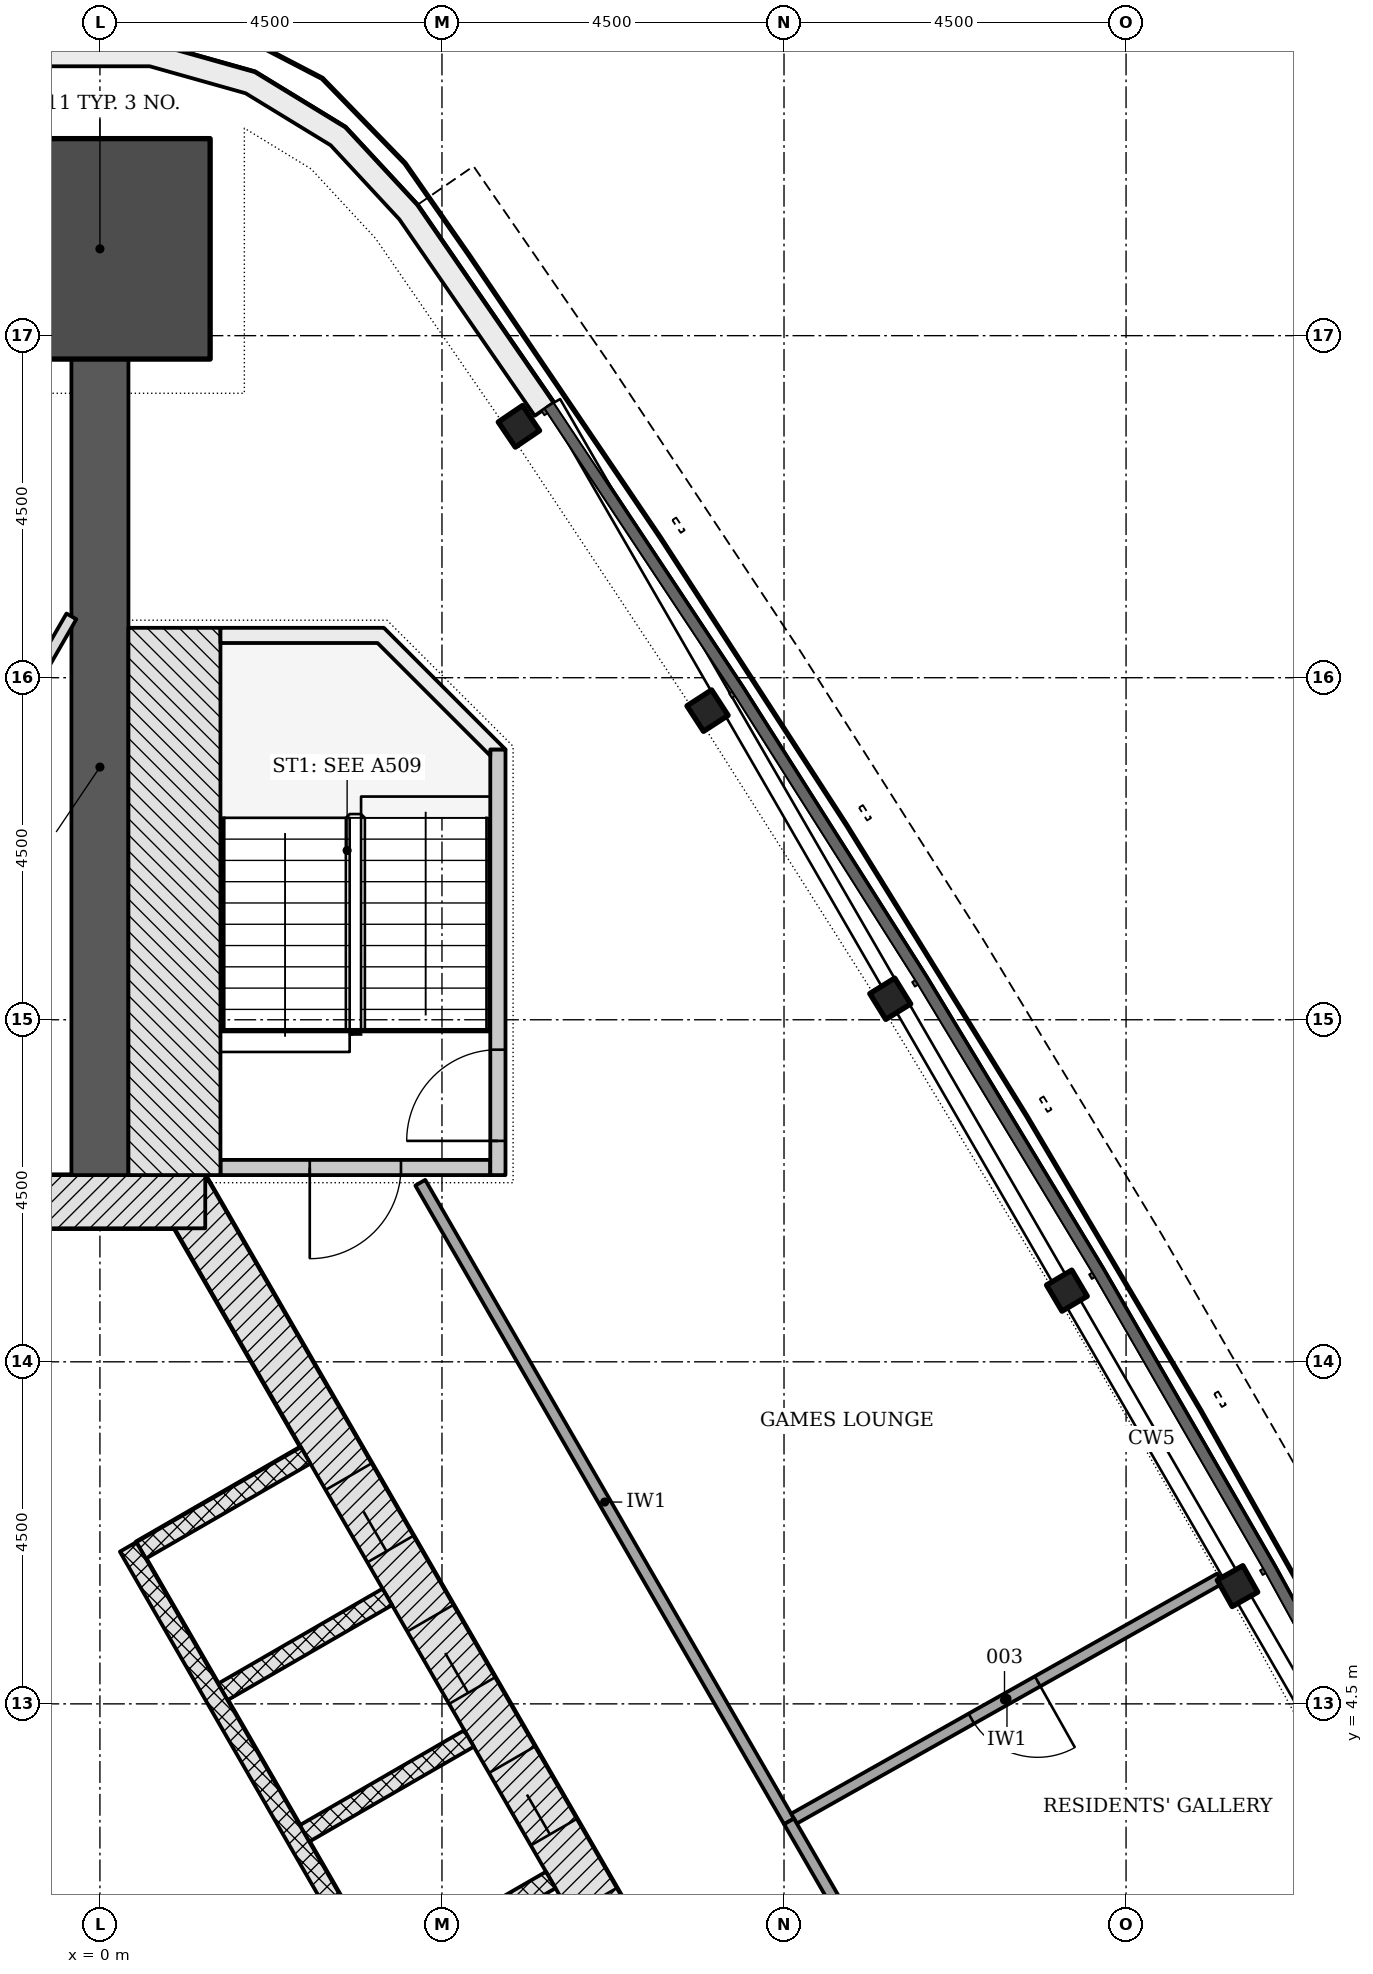
"""IFC4 building model, lengths in metres.
Left out: names, types, materials, properties, quantities, classifications, styles, units other than length and angle.
Written with IfcOpenShell. Run it as: python <this file> out.ifc"""

import sys

from ifc_helpers import new_model, si_unit, direction, frame, frame_2d, origin, origin_2d, place, context, subcontext, project, spatial, polyline, rectangle, i_section, outline, extrude, element, fill, save


model = new_model("IFC4")
c1 = context("Model", 3, precision=1e-05, world=origin(), true_north=direction((0.0, 1.0)))
c2 = subcontext(c1, "Body", "Model", "MODEL_VIEW")
j1 = project(units=[si_unit("LENGTHUNIT", "METRE"), si_unit("PLANEANGLEUNIT", "RADIAN")], contexts=[c1])
p1 = place(None, origin())
s1 = spatial("IfcSite", under=j1, at=p1, CompositionType="ELEMENT")
p2 = place(p1, origin())
s2 = spatial("IfcBuilding", under=s1, at=p2, CompositionType="ELEMENT")
p3 = place(p2, frame((0.0, 0.0, 150.9)))
s3 = spatial("IfcBuildingStorey", under=s2, at=p3, CompositionType="ELEMENT", Elevation=150.9)
p4 = place(p3, frame((10.311, -4.703, -0.2), z_axis=(0.0, 0.0, 1.0), x_axis=(-0.500001446645, 0.866024568562, 0.0)))
e1 = element("IfcWall", 1, at=p4, inside=s3, PredefinedType="SHEAR", context=c2, shape_type="SweptSolid", body=[
    extrude(rectangle(XDim=18.458, YDim=0.7, at=frame_2d((9.229, 0.0))), origin(), (0.0, 0.0, 1.0), 3.6),
])
p5 = place(p4, frame((4.379, 0.0, 0.2)))
e2 = element("IfcOpeningElement", 2, at=p5, cuts=e1, PredefinedType="OPENING", context=c2, shape_type="SweptSolid", body=[
    extrude(rectangle(XDim=1.1, YDim=2.1, at=frame_2d((0.55, 1.05))), frame((0.0, 0.36, 0.0), z_axis=(0.0, -1.0, 0.0), x_axis=(1.0, 0.0, 0.0)), (0.0, 0.0, 1.0), 0.72),
])
p6 = place(p4, frame((6.529, 0.0, 0.2)))
e3 = element("IfcOpeningElement", 3, at=p6, cuts=e1, PredefinedType="OPENING", context=c2, shape_type="SweptSolid", body=[
    extrude(rectangle(XDim=1.1, YDim=2.1, at=frame_2d((0.55, 1.05))), frame((0.0, 0.36, 0.0), z_axis=(0.0, -1.0, 0.0), x_axis=(1.0, 0.0, 0.0)), (0.0, 0.0, 1.0), 0.72),
])
p7 = place(p4, frame((8.679, 0.0, 0.2)))
e4 = element("IfcOpeningElement", 4, at=p7, cuts=e1, PredefinedType="OPENING", context=c2, shape_type="SweptSolid", body=[
    extrude(rectangle(XDim=1.1, YDim=2.1, at=frame_2d((0.55, 1.05))), frame((0.0, 0.36, 0.0), z_axis=(0.0, -1.0, 0.0), x_axis=(1.0, 0.0, 0.0)), (0.0, 0.0, 1.0), 0.72),
])
p8 = place(p4, frame((10.829, 0.0, 0.2)))
e5 = element("IfcOpeningElement", 5, at=p8, cuts=e1, PredefinedType="OPENING", context=c2, shape_type="SweptSolid", body=[
    extrude(rectangle(XDim=1.1, YDim=2.1, at=frame_2d((0.55, 1.05))), frame((0.0, 0.36, 0.0), z_axis=(0.0, -1.0, 0.0), x_axis=(1.0, 0.0, 0.0)), (0.0, 0.0, 1.0), 0.72),
])
p9 = place(p4, frame((12.979, 0.0, 0.2)))
e6 = element("IfcOpeningElement", 6, at=p9, cuts=e1, PredefinedType="OPENING", context=c2, shape_type="SweptSolid", body=[
    extrude(rectangle(XDim=1.1, YDim=2.1, at=frame_2d((0.55, 1.05))), frame((0.0, 0.36, 0.0), z_axis=(0.0, -1.0, 0.0), x_axis=(1.0, 0.0, 0.0)), (0.0, 0.0, 1.0), 0.72),
])
p10 = place(p3, frame((1.386, 11.106, -0.2), z_axis=(0.0, 0.0, 1.0), x_axis=(-1.0, 0.0, 0.0)))
e7 = element("IfcWall", 7, at=p10, inside=s3, PredefinedType="SHEAR", context=c2, shape_type="SweptSolid", body=[
    extrude(rectangle(XDim=2.771, YDim=0.7, at=frame_2d((1.386, 0.0))), origin(), (0.0, 0.0, 1.0), 3.6),
])
p11 = place(p3, frame((0.0, 11.456, -0.2), z_axis=(0.0, 0.0, 1.0), x_axis=(0.0, 1.0, 0.0)))
e8 = element("IfcWall", 8, at=p11, inside=s3, PredefinedType="SHEAR", context=c2, shape_type="SweptSolid", body=[
    extrude(rectangle(XDim=10.736, YDim=0.75, at=frame_2d((5.368, 0.0))), origin(), (0.0, 0.0, 1.0), 3.6),
])
p12 = place(p3, frame((0.0, 23.642, -0.2), z_axis=(0.0, 0.0, 1.0), x_axis=(0.0, 1.0, 0.0)))
e9 = element("IfcColumn", 9, at=p12, inside=s3, PredefinedType="COLUMN", context=c2, shape_type="SweptSolid", body=[
    extrude(rectangle(XDim=2.9, YDim=2.9, at=origin_2d()), origin(), (0.0, 0.0, 1.0), 3.6),
])
for number, where, z_axis, x_axis in (
    (10, (14.966, 6.049, -0.2), (0.0, 0.0, 1.0), (-0.491, 0.871, 0.0)),
    (11, (12.722, 9.936, -0.2), (0.0, 0.0, 1.0), (-0.509, 0.861, 0.0)),
    (12, (10.397, 13.776, -0.2), (0.0, 0.0, 1.0), (-0.527, 0.85, 0.0)),
    (13, (7.994, 17.567, -0.2), (0.0, 0.0, 1.0), (-0.544, 0.839, 0.0)),
    (14, (5.512, 21.307, -0.2), (0.0, 0.0, 1.0), (-0.561, 0.828, 0.0)),
):
    element("IfcColumn", number, at=place(p3, frame(where, z_axis=z_axis, x_axis=x_axis)), inside=s3, PredefinedType="COLUMN", context=c2, shape_type="SweptSolid", body=[
        extrude(i_section(OverallWidth=0.399, OverallDepth=0.386, WebThickness=0.021, FlangeThickness=0.033, FilletRadius=0.015, at=origin_2d()), origin(), (0.0, 0.0, 1.0), 3.6),
    ])
p13 = place(p3, origin())
e15 = element("IfcWall", 15, at=p13, inside=s3, PredefinedType="NOTDEFINED", context=c2, shape_type="SweptSolid", body=[
    extrude(outline(polyline([(5.968, 21.616), (4.174, 24.219), (3.227, 25.24), (2.038, 25.967), (0.697, 26.344), (-0.697, 26.344), (-2.038, 25.967), (-3.227, 25.24), (-4.174, 24.219), (-5.968, 21.616), (-5.721, 21.446), (-3.939, 24.03), (-3.035, 25.005), (-1.917, 25.689), (-0.655, 26.044), (0.655, 26.044), (1.917, 25.689), (3.035, 25.005), (3.939, 24.03), (5.721, 21.446), (5.968, 21.616)])), origin(), (0.0, 0.0, 1.0), 3.3),
])
p14 = place(p3, frame((5.931, 2.183, -0.2), z_axis=(0.0, 0.0, 1.0), x_axis=(-0.866047370643, -0.499961950354, 0.0)))
e16 = element("IfcWall", 16, at=p14, inside=s3, PredefinedType="PARTITIONING", context=c2, shape_type="SweptSolid", body=[
    extrude(rectangle(XDim=2.5, YDim=0.25, at=frame_2d((1.25, 0.0))), origin(), (0.0, 0.0, 1.0), 3.6),
])
for number, where, z_axis, x_axis in (
    (17, (4.856, 4.045, -0.2), (0.0, 0.0, 1.0), (-0.866, -0.5, 0.0)),
    (18, (3.781, 5.907, -0.2), (0.0, 0.0, 1.0), (-0.866, -0.5, 0.0)),
    (19, (2.706, 7.769, -0.2), (0.0, 0.0, 1.0), (-0.866, -0.5, 0.0)),
):
    element("IfcWall", number, at=place(p3, frame(where, z_axis=z_axis, x_axis=x_axis)), inside=s3, PredefinedType="PARTITIONING", context=c2, shape_type="SweptSolid", body=[
        extrude(rectangle(XDim=2.5, YDim=0.25, at=frame_2d((1.25, 0.0))), origin(), (0.0, 0.0, 1.0), 3.6),
    ])
p15 = place(p3, frame((5.87, -2.961, 0.0), z_axis=(0.0, 0.0, 1.0), x_axis=(-0.50000615651, 0.866021849293, 0.0)))
e20 = element("IfcWall", 20, at=p15, inside=s3, PredefinedType="PARTITIONING", context=c2, shape_type="SweptSolid", body=[
    extrude(rectangle(XDim=11.0, YDim=0.25, at=frame_2d((5.5, 0.0))), origin(), (0.0, 0.0, 1.0), 3.4),
])
p16 = place(p3, frame((5.135, 11.556, -0.2), z_axis=(0.0, 0.0, 1.0), x_axis=(-1.0, 0.0, 0.0)))
e21 = element("IfcWall", 21, at=p16, inside=s3, PredefinedType="SHEAR", context=c2, shape_type="SweptSolid", body=[
    extrude(rectangle(XDim=3.55, YDim=0.2, at=frame_2d((1.775, 0.0))), origin(), (0.0, 0.0, 1.0), 3.6),
])
p17 = place(p16, frame((1.175, 0.0, 0.2)))
e22 = element("IfcOpeningElement", 22, at=p17, cuts=e21, PredefinedType="OPENING", context=c2, shape_type="SweptSolid", body=[
    extrude(rectangle(XDim=1.2, YDim=2.1, at=frame_2d((0.6, 1.05))), frame((0.0, 0.11, 0.0), z_axis=(0.0, -1.0, 0.0), x_axis=(1.0, 0.0, 0.0)), (0.0, 0.0, 1.0), 0.22),
])
p18 = place(p3, frame((5.236, 11.456, -0.2), z_axis=(0.0, 0.0, 1.0), x_axis=(0.0, 1.0, 0.0)))
e23 = element("IfcWall", 23, at=p18, inside=s3, PredefinedType="SHEAR", context=c2, shape_type="SweptSolid", body=[
    extrude(rectangle(XDim=5.6, YDim=0.2, at=frame_2d((2.8, 0.0))), origin(), (0.0, 0.0, 1.0), 3.6),
])
p19 = place(p18, frame((0.45, 0.0, 0.2)))
e24 = element("IfcOpeningElement", 24, at=p19, cuts=e23, PredefinedType="OPENING", context=c2, shape_type="SweptSolid", body=[
    extrude(rectangle(XDim=1.2, YDim=2.1, at=frame_2d((0.6, 1.05))), frame((0.0, 0.11, 0.0), z_axis=(0.0, -1.0, 0.0), x_axis=(1.0, 0.0, 0.0)), (0.0, 0.0, 1.0), 0.22),
])
p20 = place(p3, frame((0.98, 11.456, -0.2), z_axis=(0.0, 0.0, 1.0), x_axis=(0.0, 1.0, 0.0)))
e25 = element("IfcWall", 25, at=p20, inside=s3, PredefinedType="SHEAR", context=c2, shape_type="SweptSolid", body=[
    extrude(rectangle(XDim=7.2, YDim=1.211, at=frame_2d((3.6, 0.0))), origin(), (0.0, 0.0, 1.0), 3.6),
])
p21 = place(p3, frame((0.0, 0.0, -0.2)))
e26 = element("IfcWall", 26, at=p21, inside=s3, PredefinedType="SHEAR", context=c2, shape_type="SweptSolid", body=[
    extrude(outline(polyline([(5.336, 17.056), (3.736, 18.656), (1.586, 18.656), (1.586, 18.456), (3.653, 18.456), (5.135, 16.974), (5.135, 17.056), (5.135, 17.056), (5.135, 17.056), (5.135, 17.056), (5.135, 17.056), (5.135, 17.056), (5.135, 17.056), (5.135, 17.056), (5.135, 17.056), (5.135, 17.056), (5.135, 17.056), (5.135, 17.056), (5.135, 17.056), (5.135, 17.056), (5.135, 17.056), (5.135, 17.056), (5.135, 17.056), (5.336, 17.056)])), origin(), (0.0, 0.0, 1.0), 3.6),
])
p22 = place(p3, frame((9.066, 2.953, 0.0), z_axis=(0.0, 0.0, 1.0), x_axis=(-0.500003417229, 0.866023430837, 0.0)))
e27 = element("IfcWall", 27, at=p22, inside=s3, PredefinedType="PARTITIONING", context=c2, shape_type="SweptSolid", body=[
    extrude(rectangle(XDim=9.703, YDim=0.15, at=frame_2d((4.852, 0.0))), origin(), (0.0, 0.0, 1.0), 2.847),
])
p23 = place(p3, frame((16.901, 2.221, 0.0), z_axis=(0.0, 0.0, 1.0), x_axis=(-0.881144631688, -0.472846844177, 0.0)))
e28 = element("IfcWall", 28, at=p23, inside=s3, PredefinedType="PARTITIONING", context=c2, shape_type="SweptSolid", body=[
    extrude(rectangle(XDim=6.347, YDim=0.15, at=frame_2d((3.173, 0.0))), origin(), (0.0, 0.0, 1.0), 3.4),
])
p24 = place(p23, frame((2.711, 0.0, 0.0)))
e29 = element("IfcOpeningElement", 29, at=p24, cuts=e28, PredefinedType="OPENING", context=c2, shape_type="SweptSolid", body=[
    extrude(rectangle(XDim=1.0, YDim=2.1, at=frame_2d((0.5, 1.05))), frame((0.0, 0.085, 0.0), z_axis=(0.0, -1.0, 0.0), x_axis=(1.0, 0.0, 0.0)), (0.0, 0.0, 1.0), 0.17),
])
p25 = place(p3, frame((14.735, 6.149, 0.0), z_axis=(0.0, 0.0, 1.0), x_axis=(-0.871163720424, -0.490992639676, 0.0)))
e30 = element("IfcWall", 30, at=p25, inside=s3, PredefinedType="PARTITIONING", context=c2, shape_type="SweptSolid", body=[
    extrude(rectangle(XDim=6.433, YDim=0.15, at=frame_2d((3.216, 0.0))), origin(), (0.0, 0.0, 1.0), 3.4),
])
p26 = place(p25, frame((2.754, 0.0, 0.0)))
e31 = element("IfcOpeningElement", 31, at=p26, cuts=e30, PredefinedType="OPENING", context=c2, shape_type="SweptSolid", body=[
    extrude(rectangle(XDim=1.0, YDim=2.1, at=frame_2d((0.5, 1.05))), frame((0.0, 0.085, 0.0), z_axis=(0.0, -1.0, 0.0), x_axis=(1.0, 0.0, 0.0)), (0.0, 0.0, 1.0), 0.17),
])
p27 = place(p3, frame((11.242, -0.816, 0.0), z_axis=(0.0, 0.0, 1.0), x_axis=(-0.499994385119, 0.866028645513, 0.0)))
e32 = element("IfcWall", 32, at=p27, inside=s3, PredefinedType="PARTITIONING", context=c2, shape_type="SweptSolid", body=[
    extrude(rectangle(XDim=4.352, YDim=0.15, at=frame_2d((2.176, 0.0))), origin(), (0.0, 0.0, 1.0), 2.847),
])
p28 = place(p27, frame((1.426, 0.0, 0.0)))
e33 = element("IfcOpeningElement", 33, at=p28, cuts=e32, PredefinedType="OPENING", context=c2, shape_type="SweptSolid", body=[
    extrude(rectangle(XDim=1.5, YDim=2.1, at=frame_2d((0.75, 1.05))), frame((0.0, 0.085, 0.0), z_axis=(0.0, -1.0, 0.0), x_axis=(1.0, 0.0, 0.0)), (0.0, 0.0, 1.0), 0.17),
])
p29 = place(p3, frame((-0.375, 18.807, 0.0), z_axis=(0.0, 0.0, 1.0), x_axis=(-0.500002508028, -0.866023955769, 0.0)))
e34 = element("IfcWall", 34, at=p29, inside=s3, PredefinedType="PARTITIONING", context=c2, shape_type="SweptSolid", body=[
    extrude(rectangle(XDim=9.76, YDim=0.15, at=frame_2d((4.88, 0.0))), origin(), (0.0, 0.0, 1.0), 2.847),
])
p30 = place(p7, origin())
e35 = element("IfcDoor", 35, at=p30, inside=s3, OperationType="DOUBLE_DOOR_SLIDING", PredefinedType="DOOR", context=c2, shape_type="SweptSolid", body=[
    extrude(rectangle(XDim=1.1, YDim=2.1, at=frame_2d((0.55, 1.05))), frame((0.0, 0.025, 0.0), z_axis=(0.0, -1.0, 0.0), x_axis=(1.0, 0.0, 0.0)), (0.0, 0.0, 1.0), 0.05),
])
fill(e4, e35)
p31 = place(p8, origin())
e36 = element("IfcDoor", 36, at=p31, inside=s3, OperationType="DOUBLE_DOOR_SLIDING", PredefinedType="DOOR", context=c2, shape_type="SweptSolid", body=[
    extrude(rectangle(XDim=1.1, YDim=2.1, at=frame_2d((0.55, 1.05))), frame((0.0, 0.025, 0.0), z_axis=(0.0, -1.0, 0.0), x_axis=(1.0, 0.0, 0.0)), (0.0, 0.0, 1.0), 0.05),
])
fill(e5, e36)
p32 = place(p9, origin())
e37 = element("IfcDoor", 37, at=p32, inside=s3, OperationType="DOUBLE_DOOR_SLIDING", PredefinedType="DOOR", context=c2, shape_type="SweptSolid", body=[
    extrude(rectangle(XDim=1.1, YDim=2.1, at=frame_2d((0.55, 1.05))), frame((0.0, 0.025, 0.0), z_axis=(0.0, -1.0, 0.0), x_axis=(1.0, 0.0, 0.0)), (0.0, 0.0, 1.0), 0.05),
])
fill(e6, e37)
p33 = place(p17, origin())
e38 = element("IfcDoor", 38, at=p33, inside=s3, OperationType="SINGLE_SWING_RIGHT", PredefinedType="DOOR", context=c2, shape_type="SweptSolid", body=[
    extrude(rectangle(XDim=1.2, YDim=2.1, at=frame_2d((0.6, 1.05))), frame((0.0, 0.025, 0.0), z_axis=(0.0, -1.0, 0.0), x_axis=(1.0, 0.0, 0.0)), (0.0, 0.0, 1.0), 0.05),
])
fill(e22, e38)
p34 = place(p19, origin())
e39 = element("IfcDoor", 39, at=p34, inside=s3, OperationType="SINGLE_SWING_LEFT", PredefinedType="DOOR", context=c2, shape_type="SweptSolid", body=[
    extrude(rectangle(XDim=1.2, YDim=2.1, at=frame_2d((0.6, 1.05))), frame((0.0, 0.025, 0.0), z_axis=(0.0, -1.0, 0.0), x_axis=(1.0, 0.0, 0.0)), (0.0, 0.0, 1.0), 0.05),
])
fill(e24, e39)
p35 = place(p26, origin())
e40 = element("IfcDoor", 40, at=p35, inside=s3, OperationType="SINGLE_SWING_LEFT", PredefinedType="DOOR", context=c2, shape_type="SweptSolid", body=[
    extrude(rectangle(XDim=1.0, YDim=2.1, at=frame_2d((0.5, 1.05))), frame((0.0, 0.025, 0.0), z_axis=(0.0, -1.0, 0.0), x_axis=(1.0, 0.0, 0.0)), (0.0, 0.0, 1.0), 0.05),
])
fill(e31, e40)
save(model, sys.argv[1])
